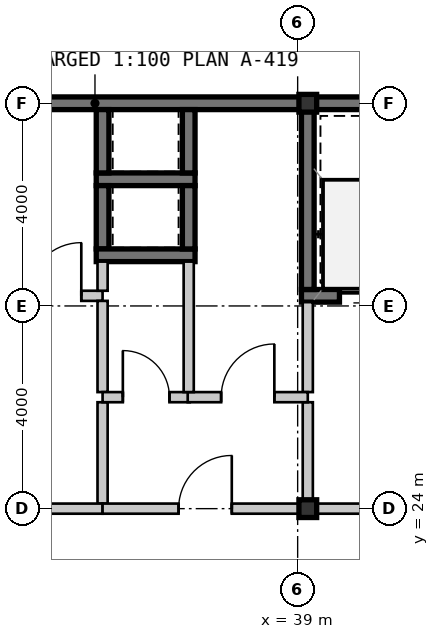
"""IFC4 building model, lengths in metres.
Left out: names, types, materials, properties, quantities, classifications, styles, units other than length and angle.
Written with IfcOpenShell. Run it as: python <this file> out.ifc"""

import sys

from ifc_helpers import new_model, si_unit, direction, frame, frame_2d, origin, origin_2d, place, context, subcontext, project, spatial, rectangle, hollow_rectangle, extrude, source, transform, mapped, element, fill, save


model = new_model("IFC4")
c1 = context("Model", 3, precision=1e-05, world=origin(), true_north=direction((0.0, 1.0)))
c2 = subcontext(c1, "Body", "Model", "MODEL_VIEW")
j1 = project(units=[si_unit("LENGTHUNIT", "METRE"), si_unit("PLANEANGLEUNIT", "RADIAN")], contexts=[c1])
p1 = place(None, origin())
s1 = spatial("IfcSite", under=j1, at=p1, CompositionType="ELEMENT")
p2 = place(p1, origin())
s2 = spatial("IfcBuilding", under=s1, at=p2, CompositionType="ELEMENT")
p3 = place(p2, frame((0.0, 0.0, 197.75)))
s3 = spatial("IfcBuildingStorey", under=s2, at=p3, CompositionType="ELEMENT", Elevation=197.75)
m1 = source(origin(), c2, "Body", "SweptSolid", [
    extrude(hollow_rectangle(XDim=0.35, YDim=0.35, WallThickness=0.016, at=origin_2d()), origin(), (0.0, 0.0, 1.0), 3.15),
])
for number, where, z_axis, x_axis in (
    (1, (39.2, 24.0, 0.0), (0.0, 0.0, 1.0), (1.0, 0.0, 0.0)),
    (2, (39.2, 32.0, 0.0), (0.0, 0.0, 1.0), (1.0, 0.0, 0.0)),
):
    element("IfcColumn", number, at=place(p3, frame(where, z_axis=z_axis, x_axis=x_axis)), inside=s3, PredefinedType="COLUMN", context=c2, shape_type="MappedRepresentation", body=[
        mapped(m1, transform((0.0, 0.0, 0.0), scale=1.0)),
    ])
m2 = source(origin(), c2, "Body", "SweptSolid", [
    extrude(rectangle(XDim=11.2, YDim=0.25, at=frame_2d((5.6, 0.0))), origin(), (0.0, 0.0, 1.0), 2.93),
])
p4 = place(p3, frame((28.0, 32.0, 0.0), z_axis=(0.0, 0.0, 1.0), x_axis=(1.0, 0.0, 0.0)))
e3 = element("IfcWall", 3, at=p4, inside=s3, PredefinedType="SHEAR", context=c2, shape_type="MappedRepresentation", body=[
    mapped(m2, transform((0.0, 0.0, 0.0), scale=1.0)),
])
m3 = source(origin(), c2, "Body", "SweptSolid", [
    extrude(rectangle(XDim=11.925, YDim=0.25, at=frame_2d((5.962, 0.0))), origin(), (0.0, 0.0, 1.0), 2.93),
])
p5 = place(p3, frame((39.2, 32.0, 0.0), z_axis=(0.0, 0.0, 1.0), x_axis=(1.0, 0.0, 0.0)))
e4 = element("IfcWall", 4, at=p5, inside=s3, PredefinedType="SHEAR", context=c2, shape_type="MappedRepresentation", body=[
    mapped(m3, transform((0.0, 0.0, 0.0), scale=1.0)),
])
m4 = source(origin(), c2, "Body", "SweptSolid", [
    extrude(rectangle(XDim=1.95, YDim=0.25, at=frame_2d((0.975, 0.0))), origin(), (0.0, 0.0, 1.0), 2.93),
])
p6 = place(p3, frame((35.025, 30.5, 0.0), z_axis=(0.0, 0.0, 1.0), x_axis=(1.0, 0.0, 0.0)))
e5 = element("IfcWall", 5, at=p6, inside=s3, PredefinedType="SHEAR", context=c2, shape_type="MappedRepresentation", body=[
    mapped(m4, transform((0.0, 0.0, 0.0), scale=1.0)),
])
m5 = source(origin(), c2, "Body", "SweptSolid", [
    extrude(rectangle(XDim=1.25, YDim=0.25, at=frame_2d((0.625, 0.0))), origin(), (0.0, 0.0, 1.0), 2.93),
])
for number, where, z_axis, x_axis in (
    (6, (35.15, 31.875, 0.0), (0.0, 0.0, 1.0), (0.0, -1.0, 0.0)),
    (7, (36.85, 30.625, 0.0), (0.0, 0.0, 1.0), (0.0, 1.0, 0.0)),
    (8, (35.15, 30.375, 0.0), (0.0, 0.0, 1.0), (0.0, -1.0, 0.0)),
):
    element("IfcWall", number, at=place(p3, frame(where, z_axis=z_axis, x_axis=x_axis)), inside=s3, PredefinedType="SHEAR", context=c2, shape_type="MappedRepresentation", body=[
        mapped(m5, transform((0.0, 0.0, 0.0), scale=1.0)),
    ])
p7 = place(p3, frame((35.025, 29.0, 0.0), z_axis=(0.0, 0.0, 1.0), x_axis=(1.0, 0.0, 0.0)))
e9 = element("IfcWall", 9, at=p7, inside=s3, PredefinedType="SHEAR", context=c2, shape_type="MappedRepresentation", body=[
    mapped(m4, transform((0.0, 0.0, 0.0), scale=1.0)),
])
p8 = place(p3, frame((36.85, 29.125, 0.0), z_axis=(0.0, 0.0, 1.0), x_axis=(0.0, 1.0, 0.0)))
e10 = element("IfcWall", 10, at=p8, inside=s3, PredefinedType="SHEAR", context=c2, shape_type="MappedRepresentation", body=[
    mapped(m5, transform((0.0, 0.0, 0.0), scale=1.0)),
])
m6 = source(origin(), c2, "Body", "SweptSolid", [
    extrude(rectangle(XDim=2.425, YDim=0.25, at=frame_2d((1.212, 0.0))), origin(), (0.0, 0.0, 1.0), 2.93),
])
p9 = place(p3, frame((39.075, 28.2, 0.0), z_axis=(0.0, 0.0, 1.0), x_axis=(1.0, 0.0, 0.0)))
e11 = element("IfcWall", 11, at=p9, inside=s3, PredefinedType="SHEAR", context=c2, shape_type="MappedRepresentation", body=[
    mapped(m6, transform((0.0, 0.0, 0.0), scale=1.0)),
])
m7 = source(origin(), c2, "Body", "SweptSolid", [
    extrude(rectangle(XDim=1.05, YDim=2.15, at=frame_2d((0.525, 1.075))), frame((0.0, 0.135, 0.0), z_axis=(0.0, -1.0, 0.0), x_axis=(1.0, 0.0, 0.0)), (0.0, 0.0, 1.0), 0.27),
])
p10 = place(p9, frame((0.75, 0.0, 0.0)))
e12 = element("IfcOpeningElement", 12, at=p10, cuts=e11, PredefinedType="OPENING", context=c2, shape_type="MappedRepresentation", body=[
    mapped(m7, transform((0.0, 0.0, 0.0), scale=1.0)),
])
m8 = source(origin(), c2, "Body", "SweptSolid", [
    extrude(rectangle(XDim=3.55, YDim=0.25, at=frame_2d((1.775, 0.0))), origin(), (0.0, 0.0, 1.0), 2.93),
])
p11 = place(p3, frame((39.2, 31.875, 0.0), z_axis=(0.0, 0.0, 1.0), x_axis=(0.0, -1.0, 0.0)))
e13 = element("IfcWall", 13, at=p11, inside=s3, PredefinedType="SHEAR", context=c2, shape_type="MappedRepresentation", body=[
    mapped(m8, transform((0.0, 0.0, 0.0), scale=1.0)),
])
m9 = source(origin(), c2, "Body", "SweptSolid", [
    extrude(rectangle(XDim=2.0, YDim=0.2, at=frame_2d((1.0, 0.0))), origin(), (0.0, 0.0, 1.0), 2.47),
])
p12 = place(p3, frame((39.2, 24.1, 0.0), z_axis=(0.0, 0.0, 1.0), x_axis=(0.0, 1.0, 0.0)))
e14 = element("IfcWall", 14, at=p12, inside=s3, PredefinedType="SOLIDWALL", context=c2, shape_type="MappedRepresentation", body=[
    mapped(m9, transform((0.0, 0.0, 0.0), scale=1.0)),
])
m10 = source(origin(), c2, "Body", "SweptSolid", [
    extrude(rectangle(XDim=1.775, YDim=0.2, at=frame_2d((0.887, 0.0))), origin(), (0.0, 0.0, 1.0), 2.47),
])
p13 = place(p3, frame((39.2, 26.3, 0.0), z_axis=(0.0, 0.0, 1.0), x_axis=(0.0, 1.0, 0.0)))
e15 = element("IfcWall", 15, at=p13, inside=s3, PredefinedType="SOLIDWALL", context=c2, shape_type="MappedRepresentation", body=[
    mapped(m10, transform((0.0, 0.0, 0.0), scale=1.0)),
])
m11 = source(origin(), c2, "Body", "SweptSolid", [
    extrude(rectangle(XDim=4.35, YDim=0.2, at=frame_2d((2.175, 0.0))), origin(), (0.0, 0.0, 1.0), 2.397),
])
p14 = place(p3, frame((43.55, 24.0, 0.0), z_axis=(0.0, 0.0, 1.0), x_axis=(-1.0, 0.0, 0.0)))
e16 = element("IfcWall", 16, at=p14, inside=s3, PredefinedType="SOLIDWALL", context=c2, shape_type="MappedRepresentation", body=[
    mapped(m11, transform((0.0, 0.0, 0.0), scale=1.0)),
])
m12 = source(origin(), c2, "Body", "SweptSolid", [
    extrude(rectangle(XDim=1.05, YDim=2.1, at=frame_2d((0.525, 1.05))), frame((0.0, 0.11, 0.0), z_axis=(0.0, -1.0, 0.0), x_axis=(1.0, 0.0, 0.0)), (0.0, 0.0, 1.0), 0.22),
])
p15 = place(p14, frame((1.65, 0.0, 0.0)))
e17 = element("IfcOpeningElement", 17, at=p15, cuts=e16, PredefinedType="OPENING", context=c2, shape_type="MappedRepresentation", body=[
    mapped(m12, transform((0.0, 0.0, 0.0), scale=1.0)),
])
m13 = source(origin(), c2, "Body", "SweptSolid", [
    extrude(rectangle(XDim=4.35, YDim=0.2, at=frame_2d((2.175, 0.0))), origin(), (0.0, 0.0, 1.0), 2.93),
])
p16 = place(p3, frame((30.8, 28.2, 0.0), z_axis=(0.0, 0.0, 1.0), x_axis=(1.0, 0.0, 0.0)))
e18 = element("IfcWall", 18, at=p16, inside=s3, PredefinedType="SOLIDWALL", context=c2, shape_type="MappedRepresentation", body=[
    mapped(m13, transform((0.0, 0.0, 0.0), scale=1.0)),
])
p17 = place(p16, frame((2.88, 0.0, 0.0)))
e19 = element("IfcOpeningElement", 19, at=p17, cuts=e18, PredefinedType="OPENING", context=c2, shape_type="MappedRepresentation", body=[
    mapped(m12, transform((0.0, 0.0, 0.0), scale=1.0)),
])
m14 = source(origin(), c2, "Body", "SweptSolid", [
    extrude(rectangle(XDim=2.0, YDim=0.2, at=frame_2d((1.0, 0.0))), origin(), (0.0, 0.0, 1.0), 2.93),
])
p18 = place(p3, frame((35.15, 26.1, 0.0), z_axis=(0.0, 0.0, 1.0), x_axis=(0.0, -1.0, 0.0)))
e20 = element("IfcWall", 20, at=p18, inside=s3, PredefinedType="SOLIDWALL", context=c2, shape_type="MappedRepresentation", body=[
    mapped(m14, transform((0.0, 0.0, 0.0), scale=1.0)),
])
m15 = source(origin(), c2, "Body", "SweptSolid", [
    extrude(rectangle(XDim=1.8, YDim=0.2, at=frame_2d((0.9, 0.0))), origin(), (0.0, 0.0, 1.0), 2.93),
])
p19 = place(p3, frame((35.15, 28.1, 0.0), z_axis=(0.0, 0.0, 1.0), x_axis=(0.0, -1.0, 0.0)))
e21 = element("IfcWall", 21, at=p19, inside=s3, PredefinedType="SOLIDWALL", context=c2, shape_type="MappedRepresentation", body=[
    mapped(m15, transform((0.0, 0.0, 0.0), scale=1.0)),
])
m16 = source(origin(), c2, "Body", "SweptSolid", [
    extrude(rectangle(XDim=4.35, YDim=0.2, at=frame_2d((2.175, 0.0))), origin(), (0.0, 0.0, 1.0), 2.47),
])
p20 = place(p3, frame((35.15, 24.0, 0.0), z_axis=(0.0, 0.0, 1.0), x_axis=(-1.0, 0.0, 0.0)))
e22 = element("IfcWall", 22, at=p20, inside=s3, PredefinedType="SOLIDWALL", context=c2, shape_type="MappedRepresentation", body=[
    mapped(m16, transform((0.0, 0.0, 0.0), scale=1.0)),
])
p21 = place(p20, frame((1.65, 0.0, 0.0)))
e23 = element("IfcOpeningElement", 23, at=p21, cuts=e22, PredefinedType="OPENING", context=c2, shape_type="MappedRepresentation", body=[
    mapped(m12, transform((0.0, 0.0, 0.0), scale=1.0)),
])
m17 = source(origin(), c2, "Body", "SweptSolid", [
    extrude(rectangle(XDim=0.575, YDim=0.2, at=frame_2d((0.288, 0.0))), origin(), (0.0, 0.0, 1.0), 2.93),
])
p22 = place(p3, frame((35.15, 28.875, 0.0), z_axis=(0.0, 0.0, 1.0), x_axis=(0.0, -1.0, 0.0)))
e24 = element("IfcWall", 24, at=p22, inside=s3, PredefinedType="SOLIDWALL", context=c2, shape_type="MappedRepresentation", body=[
    mapped(m17, transform((0.0, 0.0, 0.0), scale=1.0)),
])
m18 = source(origin(), c2, "Body", "SweptSolid", [
    extrude(rectangle(XDim=1.72, YDim=0.2, at=frame_2d((0.86, 0.0))), origin(), (0.0, 0.0, 1.0), 2.93),
])
p23 = place(p3, frame((35.15, 26.2, 0.0), z_axis=(0.0, 0.0, 1.0), x_axis=(1.0, 0.0, 0.0)))
e25 = element("IfcWall", 25, at=p23, inside=s3, PredefinedType="SOLIDWALL", context=c2, shape_type="MappedRepresentation", body=[
    mapped(m18, transform((0.0, 0.0, 0.0), scale=1.0)),
])
m19 = source(origin(), c2, "Body", "SweptSolid", [
    extrude(rectangle(XDim=0.92, YDim=2.1, at=frame_2d((0.46, 1.05))), frame((0.0, 0.11, 0.0), z_axis=(0.0, -1.0, 0.0), x_axis=(1.0, 0.0, 0.0)), (0.0, 0.0, 1.0), 0.22),
])
p24 = place(p23, frame((0.4, 0.0, 0.0)))
e26 = element("IfcOpeningElement", 26, at=p24, cuts=e25, PredefinedType="OPENING", context=c2, shape_type="MappedRepresentation", body=[
    mapped(m19, transform((0.0, 0.0, 0.0), scale=1.0)),
])
m20 = source(origin(), c2, "Body", "SweptSolid", [
    extrude(rectangle(XDim=2.37, YDim=0.2, at=frame_2d((1.185, 0.0))), origin(), (0.0, 0.0, 1.0), 2.93),
])
p25 = place(p3, frame((36.83, 26.2, 0.0), z_axis=(0.0, 0.0, 1.0), x_axis=(1.0, 0.0, 0.0)))
e27 = element("IfcWall", 27, at=p25, inside=s3, PredefinedType="SOLIDWALL", context=c2, shape_type="MappedRepresentation", body=[
    mapped(m20, transform((0.0, 0.0, 0.0), scale=1.0)),
])
p26 = place(p25, frame((0.66, 0.0, 0.0)))
e28 = element("IfcOpeningElement", 28, at=p26, cuts=e27, PredefinedType="OPENING", context=c2, shape_type="MappedRepresentation", body=[
    mapped(m12, transform((0.0, 0.0, 0.0), scale=1.0)),
])
m21 = source(origin(), c2, "Body", "SweptSolid", [
    extrude(rectangle(XDim=4.05, YDim=0.2, at=frame_2d((2.025, 0.0))), origin(), (0.0, 0.0, 1.0), 2.47),
])
p27 = place(p3, frame((39.2, 24.0, 0.0), z_axis=(0.0, 0.0, 1.0), x_axis=(-1.0, 0.0, 0.0)))
e29 = element("IfcWall", 29, at=p27, inside=s3, PredefinedType="SOLIDWALL", context=c2, shape_type="MappedRepresentation", body=[
    mapped(m21, transform((0.0, 0.0, 0.0), scale=1.0)),
])
p28 = place(p27, frame((1.5, 0.0, 0.0)))
e30 = element("IfcOpeningElement", 30, at=p28, cuts=e29, PredefinedType="OPENING", context=c2, shape_type="MappedRepresentation", body=[
    mapped(m12, transform((0.0, 0.0, 0.0), scale=1.0)),
])
m22 = source(origin(), c2, "Body", "SweptSolid", [
    extrude(rectangle(XDim=2.575, YDim=0.2, at=frame_2d((1.288, 0.0))), origin(), (0.0, 0.0, 1.0), 2.93),
])
p29 = place(p3, frame((36.85, 28.875, 0.0), z_axis=(0.0, 0.0, 1.0), x_axis=(0.0, -1.0, 0.0)))
e31 = element("IfcWall", 31, at=p29, inside=s3, PredefinedType="SOLIDWALL", context=c2, shape_type="MappedRepresentation", body=[
    mapped(m22, transform((0.0, 0.0, 0.0), scale=1.0)),
])
m23 = source(origin(), c2, "Body", "SweptSolid", [
    extrude(rectangle(XDim=1.05, YDim=2.15, at=frame_2d((0.525, 1.075))), frame((0.0, 0.025, 0.0), z_axis=(0.0, -1.0, 0.0), x_axis=(1.0, 0.0, 0.0)), (0.0, 0.0, 1.0), 0.05),
])
p30 = place(p10, origin())
e32 = element("IfcDoor", 32, at=p30, inside=s3, OperationType="SLIDING_TO_LEFT", PredefinedType="DOOR", context=c2, shape_type="MappedRepresentation", body=[
    mapped(m23, transform((0.0, 0.0, 0.0), scale=1.0)),
])
fill(e12, e32)
m24 = source(origin(), c2, "Body", "SweptSolid", [
    extrude(rectangle(XDim=1.05, YDim=2.1, at=frame_2d((0.525, 1.05))), frame((0.0, 0.025, 0.0), z_axis=(0.0, -1.0, 0.0), x_axis=(1.0, 0.0, 0.0)), (0.0, 0.0, 1.0), 0.05),
])
p31 = place(p17, origin())
e33 = element("IfcDoor", 33, at=p31, inside=s3, OperationType="SINGLE_SWING_RIGHT", PredefinedType="DOOR", context=c2, shape_type="MappedRepresentation", body=[
    mapped(m24, transform((0.0, 0.0, 0.0), scale=1.0)),
])
fill(e19, e33)
m25 = source(origin(), c2, "Body", "SweptSolid", [
    extrude(rectangle(XDim=0.92, YDim=2.1, at=frame_2d((0.46, 1.05))), frame((0.0, 0.025, 0.0), z_axis=(0.0, -1.0, 0.0), x_axis=(1.0, 0.0, 0.0)), (0.0, 0.0, 1.0), 0.05),
])
p32 = place(p24, origin())
e34 = element("IfcDoor", 34, at=p32, inside=s3, OperationType="SINGLE_SWING_LEFT", PredefinedType="DOOR", context=c2, shape_type="MappedRepresentation", body=[
    mapped(m25, transform((0.0, 0.0, 0.0), scale=1.0)),
])
fill(e26, e34)
p33 = place(p26, origin())
e35 = element("IfcDoor", 35, at=p33, inside=s3, OperationType="SINGLE_SWING_RIGHT", PredefinedType="DOOR", context=c2, shape_type="MappedRepresentation", body=[
    mapped(m24, transform((0.0, 0.0, 0.0), scale=1.0)),
])
fill(e28, e35)
p34 = place(p28, frame((1.05, 0.0, 0.0), z_axis=(0.0, 0.0, 1.0), x_axis=(-1.0, 0.0, 0.0)))
e36 = element("IfcDoor", 36, at=p34, inside=s3, OperationType="SINGLE_SWING_RIGHT", PredefinedType="DOOR", context=c2, shape_type="MappedRepresentation", body=[
    mapped(m24, transform((0.0, 0.0, 0.0), scale=1.0)),
])
fill(e30, e36)
save(model, sys.argv[1])
